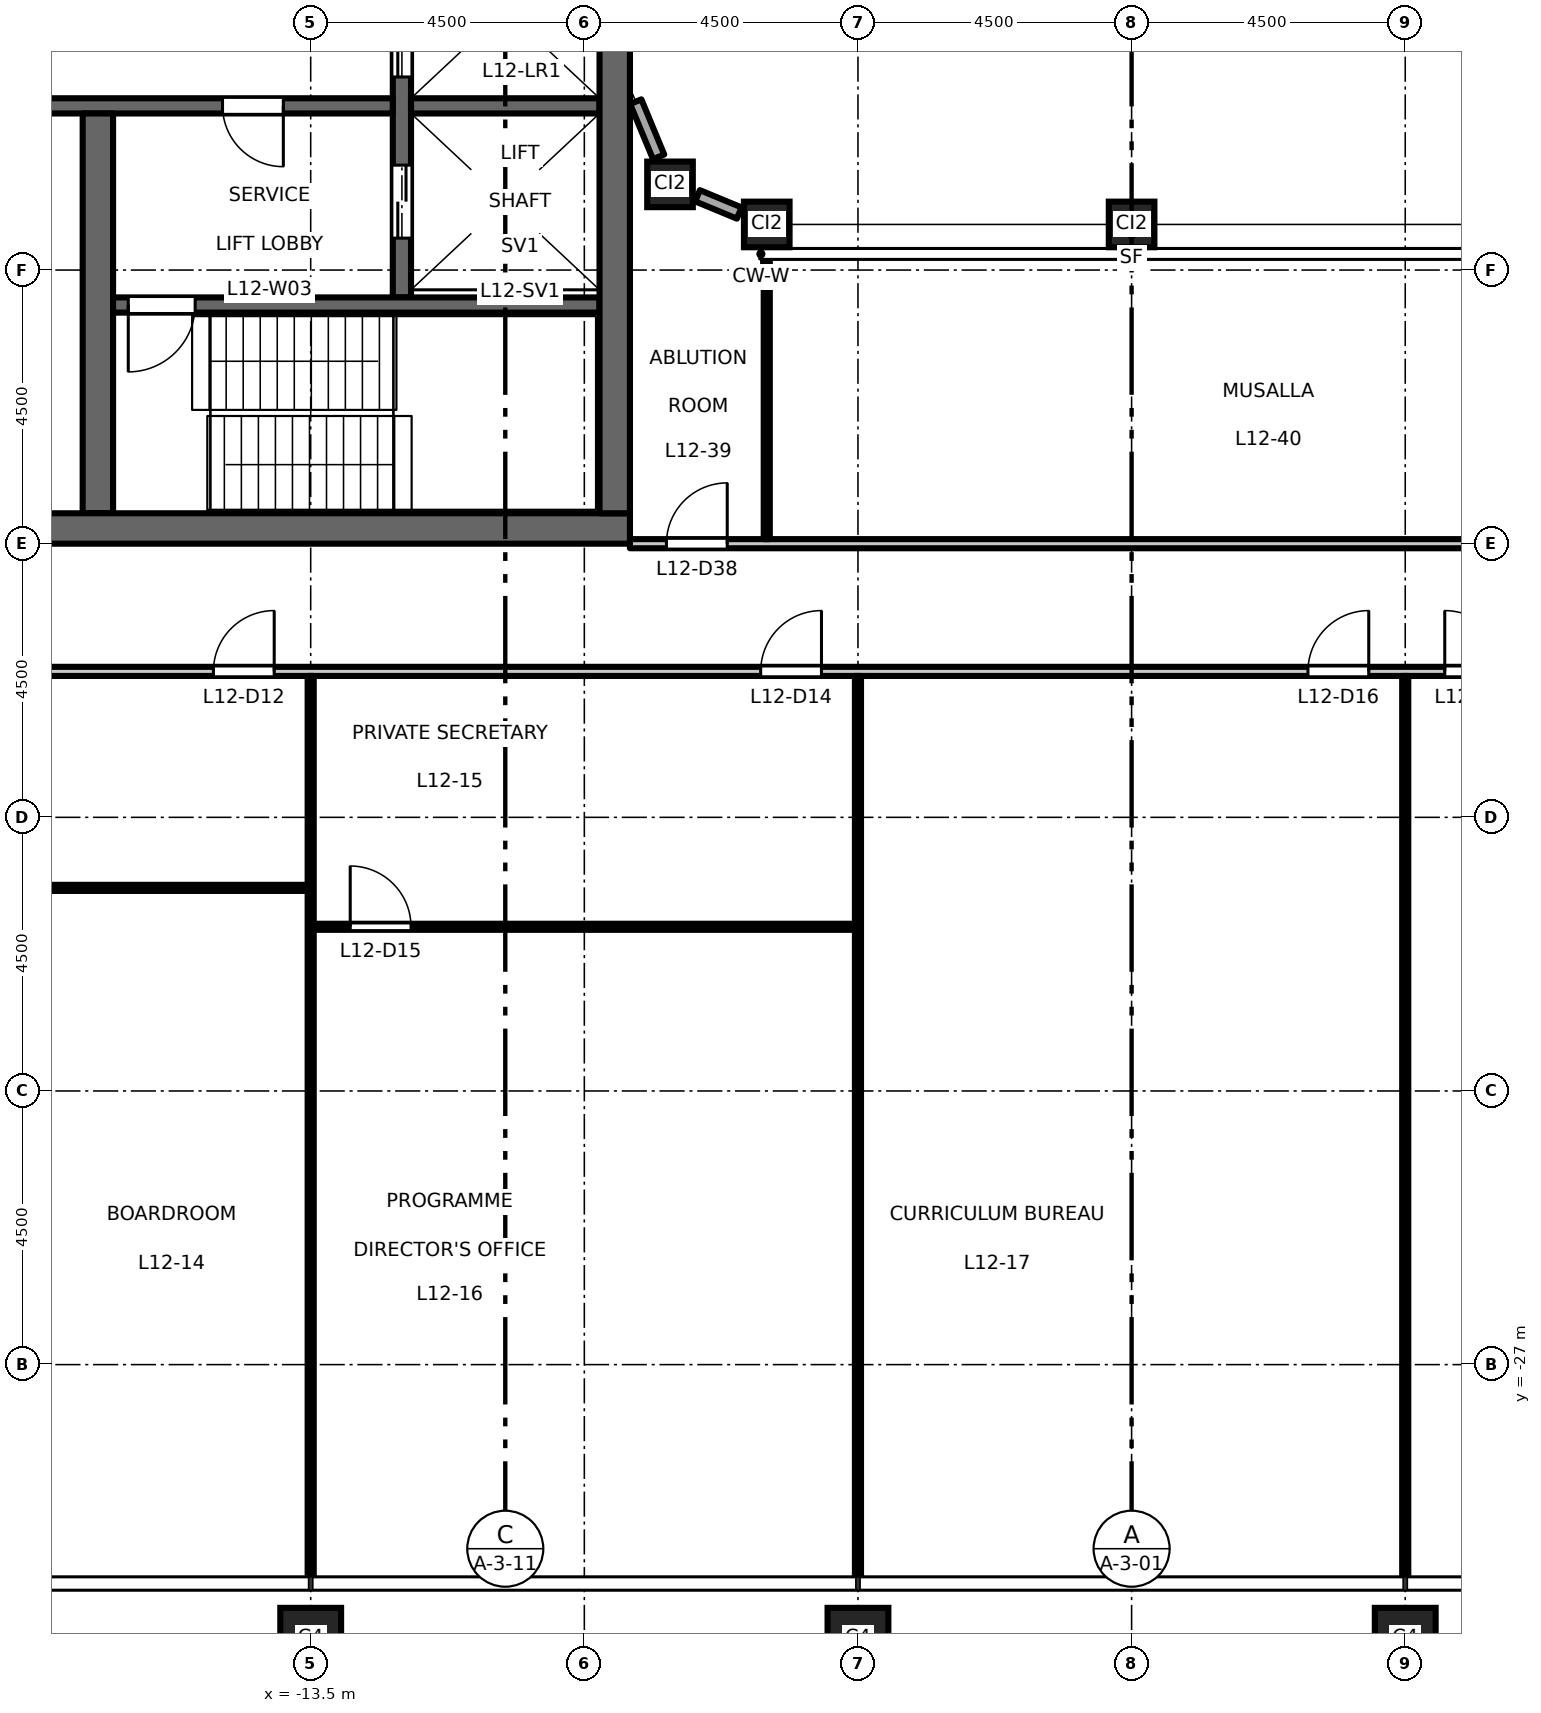
"""IFC4 building model, lengths in metres.
Left out: names, types, materials, properties, quantities, classifications, styles, units other than length and angle.
Written with IfcOpenShell. Run it as: python <this file> out.ifc"""

import sys

from ifc_helpers import new_model, si_unit, direction, frame, frame_2d, origin, origin_2d, place, context, subcontext, project, spatial, rectangle, hollow_rectangle, extrude, element, fill, save


model = new_model("IFC4")
c1 = context("Model", 3, precision=1e-05, world=origin(), true_north=direction((0.0, 1.0)))
c2 = subcontext(c1, "Body", "Model", "MODEL_VIEW")
j1 = project(units=[si_unit("LENGTHUNIT", "METRE"), si_unit("PLANEANGLEUNIT", "RADIAN")], contexts=[c1])
p1 = place(None, origin())
s1 = spatial("IfcSite", under=j1, at=p1, CompositionType="ELEMENT")
p2 = place(p1, origin())
s2 = spatial("IfcBuilding", under=s1, at=p2, CompositionType="ELEMENT")
p3 = place(p2, frame((0.0, 0.0, 58.2)))
s3 = spatial("IfcBuildingStorey", under=s2, at=p3, CompositionType="ELEMENT", Elevation=58.2)
for number, where, z_axis, x_axis in (
    (1, (-13.5, -31.5, 0.0), (0.0, 0.0, 1.0), (1.0, 0.0, 0.0)),
    (2, (-4.5, -31.5, 0.0), (0.0, 0.0, 1.0), (1.0, 0.0, 0.0)),
    (3, (4.5, -31.5, 0.0), (0.0, 0.0, 1.0), (1.0, 0.0, 0.0)),
):
    element("IfcColumn", number, at=place(p3, frame(where, z_axis=z_axis, x_axis=x_axis)), inside=s3, PredefinedType="COLUMN", context=c2, shape_type="SweptSolid", body=[
        extrude(hollow_rectangle(XDim=1.0, YDim=1.0, WallThickness=0.06, at=origin_2d()), origin(), (0.0, 0.0, 1.0), 4.5),
    ])
for number, where, z_axis, x_axis in (
    (4, (-7.591, -7.591, 0.0), (0.0, 0.0, 1.0), (1.0, 0.0, 0.0)),
    (5, (-6.0, -8.25, 0.0), (0.0, 0.0, 1.0), (1.0, 0.0, 0.0)),
    (6, (0.0, -8.25, 0.0), (0.0, 0.0, 1.0), (1.0, 0.0, 0.0)),
):
    element("IfcColumn", number, at=place(p3, frame(where, z_axis=z_axis, x_axis=x_axis)), inside=s3, PredefinedType="COLUMN", context=c2, shape_type="SweptSolid", body=[
        extrude(hollow_rectangle(XDim=0.75, YDim=0.75, WallThickness=0.045, at=origin_2d()), origin(), (0.0, 0.0, 1.0), 4.5),
    ])
p4 = place(p3, frame((-12.0, -9.45, 0.0), z_axis=(0.0, 0.0, 1.0), x_axis=(0.0, 1.0, 0.0)))
e7 = element("IfcWall", 7, at=p4, inside=s3, PredefinedType="SHEAR", context=c2, shape_type="SweptSolid", body=[
    extrude(rectangle(XDim=18.9, YDim=0.3, at=frame_2d((9.45, 0.0))), origin(), (0.0, 0.0, 1.0), 4.35),
])
p5 = place(p4, frame((3.625, 0.0, 0.0)))
e8 = element("IfcOpeningElement", 8, at=p5, cuts=e7, PredefinedType="OPENING", context=c2, shape_type="SweptSolid", body=[
    extrude(rectangle(XDim=1.1, YDim=2.1, at=frame_2d((0.55, 1.05))), frame((0.0, 0.16, 0.0), z_axis=(0.0, -1.0, 0.0), x_axis=(1.0, 0.0, 0.0)), (0.0, 0.0, 1.0), 0.32),
])
p6 = place(p4, frame((6.775, 0.0, 0.0)))
e9 = element("IfcOpeningElement", 9, at=p6, cuts=e7, PredefinedType="OPENING", context=c2, shape_type="SweptSolid", body=[
    extrude(rectangle(XDim=1.1, YDim=2.1, at=frame_2d((0.55, 1.05))), frame((0.0, 0.16, 0.0), z_axis=(0.0, -1.0, 0.0), x_axis=(1.0, 0.0, 0.0)), (0.0, 0.0, 1.0), 0.32),
])
p7 = place(p4, frame((9.925, 0.0, 0.0)))
e10 = element("IfcOpeningElement", 10, at=p7, cuts=e7, PredefinedType="OPENING", context=c2, shape_type="SweptSolid", body=[
    extrude(rectangle(XDim=1.1, YDim=2.1, at=frame_2d((0.55, 1.05))), frame((0.0, 0.16, 0.0), z_axis=(0.0, -1.0, 0.0), x_axis=(1.0, 0.0, 0.0)), (0.0, 0.0, 1.0), 0.32),
])
p8 = place(p4, frame((13.075, 0.0, 0.0)))
e11 = element("IfcOpeningElement", 11, at=p8, cuts=e7, PredefinedType="OPENING", context=c2, shape_type="SweptSolid", body=[
    extrude(rectangle(XDim=1.1, YDim=2.1, at=frame_2d((0.55, 1.05))), frame((0.0, 0.16, 0.0), z_axis=(0.0, -1.0, 0.0), x_axis=(1.0, 0.0, 0.0)), (0.0, 0.0, 1.0), 0.32),
])
p9 = place(p4, frame((16.725, 0.0, 0.0)))
e12 = element("IfcOpeningElement", 12, at=p9, cuts=e7, PredefinedType="OPENING", context=c2, shape_type="SweptSolid", body=[
    extrude(rectangle(XDim=1.2, YDim=2.1, at=frame_2d((0.6, 1.05))), frame((0.0, 0.16, 0.0), z_axis=(0.0, -1.0, 0.0), x_axis=(1.0, 0.0, 0.0)), (0.0, 0.0, 1.0), 0.32),
])
p10 = place(p4, frame((0.975, 0.0, 0.0)))
e13 = element("IfcOpeningElement", 13, at=p10, cuts=e7, PredefinedType="OPENING", context=c2, shape_type="SweptSolid", body=[
    extrude(rectangle(XDim=1.2, YDim=2.1, at=frame_2d((0.6, 1.05))), frame((0.0, 0.16, 0.0), z_axis=(0.0, -1.0, 0.0), x_axis=(1.0, 0.0, 0.0)), (0.0, 0.0, 1.0), 0.32),
])
p11 = place(p3, frame((-12.15, -6.3, 0.0), z_axis=(0.0, 0.0, 1.0), x_axis=(-1.0, 0.0, 0.0)))
e14 = element("IfcWall", 14, at=p11, inside=s3, PredefinedType="SHEAR", context=c2, shape_type="SweptSolid", body=[
    extrude(rectangle(XDim=9.1, YDim=0.25, at=frame_2d((4.55, 0.0))), origin(), (0.0, 0.0, 1.0), 4.35),
])
p12 = place(p11, frame((1.8, 0.0, 0.0)))
e15 = element("IfcOpeningElement", 15, at=p12, cuts=e14, PredefinedType="OPENING", context=c2, shape_type="SweptSolid", body=[
    extrude(rectangle(XDim=1.0, YDim=2.1, at=frame_2d((0.5, 1.05))), frame((0.0, 0.135, 0.0), z_axis=(0.0, -1.0, 0.0), x_axis=(1.0, 0.0, 0.0)), (0.0, 0.0, 1.0), 0.27),
])
p13 = place(p11, frame((6.65, 0.0, 0.0)))
e16 = element("IfcOpeningElement", 16, at=p13, cuts=e14, PredefinedType="OPENING", context=c2, shape_type="SweptSolid", body=[
    extrude(rectangle(XDim=0.9, YDim=2.1, at=frame_2d((0.45, 1.05))), frame((0.0, 0.135, 0.0), z_axis=(0.0, -1.0, 0.0), x_axis=(1.0, 0.0, 0.0)), (0.0, 0.0, 1.0), 0.27),
])
p14 = place(p3, frame((-17.0, -13.0, 0.0), z_axis=(0.0, 0.0, 1.0), x_axis=(0.0, 1.0, 0.0)))
e17 = element("IfcWall", 17, at=p14, inside=s3, PredefinedType="SHEAR", context=c2, shape_type="SweptSolid", body=[
    extrude(rectangle(XDim=6.575, YDim=0.5, at=frame_2d((3.288, 0.0))), origin(), (0.0, 0.0, 1.0), 4.35),
])
p15 = place(p3, frame((-8.75, -6.3, 0.0), z_axis=(0.0, 0.0, 1.0), x_axis=(-1.0, 0.0, 0.0)))
e18 = element("IfcWall", 18, at=p15, inside=s3, PredefinedType="SHEAR", context=c2, shape_type="SweptSolid", body=[
    extrude(rectangle(XDim=3.1, YDim=0.25, at=frame_2d((1.55, 0.0))), origin(), (0.0, 0.0, 1.0), 4.35),
])
p16 = place(p3, frame((-8.75, -9.575, 0.0), z_axis=(0.0, 0.0, 1.0), x_axis=(-1.0, 0.0, 0.0)))
e19 = element("IfcWall", 19, at=p16, inside=s3, PredefinedType="SHEAR", context=c2, shape_type="SweptSolid", body=[
    extrude(rectangle(XDim=8.0, YDim=0.25, at=frame_2d((4.0, 0.0))), origin(), (0.0, 0.0, 1.0), 4.35),
])
p17 = place(p16, frame((6.65, 0.0, 0.0)))
e20 = element("IfcOpeningElement", 20, at=p17, cuts=e19, PredefinedType="OPENING", context=c2, shape_type="SweptSolid", body=[
    extrude(rectangle(XDim=1.1, YDim=2.1, at=frame_2d((0.55, 1.05))), frame((0.0, 0.135, 0.0), z_axis=(0.0, -1.0, 0.0), x_axis=(1.0, 0.0, 0.0)), (0.0, 0.0, 1.0), 0.27),
])
p18 = place(p3, frame((-8.25, -13.25, 0.0), z_axis=(0.0, 0.0, 1.0), x_axis=(-1.0, 0.0, 0.0)))
e21 = element("IfcWall", 21, at=p18, inside=s3, PredefinedType="SHEAR", context=c2, shape_type="SweptSolid", body=[
    extrude(rectangle(XDim=13.5, YDim=0.5, at=frame_2d((6.75, 0.0))), origin(), (0.0, 0.0, 1.0), 4.35),
])
p19 = place(p3, frame((-8.5, -13.0, 0.0), z_axis=(0.0, 0.0, 1.0), x_axis=(0.0, 1.0, 0.0)))
e22 = element("IfcWall", 22, at=p19, inside=s3, PredefinedType="SHEAR", context=c2, shape_type="SweptSolid", body=[
    extrude(rectangle(XDim=26.0, YDim=0.5, at=frame_2d((13.0, 0.0))), origin(), (0.0, 0.0, 1.0), 4.35),
])
p20 = place(p3, frame((-8.154, -6.231, 0.0), z_axis=(0.0, 0.0, 1.0), x_axis=(0.382549378284, -0.923935048136, 0.0)))
e23 = element("IfcWall", 23, at=p20, inside=s3, PredefinedType="STANDARD", context=c2, shape_type="SweptSolid", body=[
    extrude(rectangle(XDim=0.982, YDim=0.2, at=frame_2d((0.491, 0.0))), origin(), (0.0, 0.0, 1.0), 3.73),
])
p21 = place(p3, frame((-7.138, -7.779, 0.0), z_axis=(0.0, 0.0, 1.0), x_axis=(0.923940677943, -0.382535780864, 0.0)))
e24 = element("IfcWall", 24, at=p21, inside=s3, PredefinedType="STANDARD", context=c2, shape_type="SweptSolid", body=[
    extrude(rectangle(XDim=0.742, YDim=0.2, at=frame_2d((0.371, 0.0))), origin(), (0.0, 0.0, 1.0), 3.73),
])
p22 = place(p3, frame((-13.45, -19.8, 0.0), z_axis=(0.0, 0.0, 1.0), x_axis=(1.0, 0.0, 0.0)))
e25 = element("IfcWall", 25, at=p22, inside=s3, PredefinedType="PARTITIONING", context=c2, shape_type="SweptSolid", body=[
    extrude(rectangle(XDim=8.9, YDim=0.1, at=frame_2d((4.45, 0.0))), origin(), (0.0, 0.0, 1.0), 4.35),
])
p23 = place(p22, frame((0.6, 0.0, 0.0)))
e26 = element("IfcOpeningElement", 26, at=p23, cuts=e25, PredefinedType="OPENING", context=c2, shape_type="SweptSolid", body=[
    extrude(rectangle(XDim=1.0, YDim=2.1, at=frame_2d((0.5, 1.05))), frame((0.0, 0.06, 0.0), z_axis=(0.0, -1.0, 0.0), x_axis=(1.0, 0.0, 0.0)), (0.0, 0.0, 1.0), 0.12),
])
p24 = place(p3, frame((-22.45, -19.16, 0.0), z_axis=(0.0, 0.0, 1.0), x_axis=(1.0, 0.0, 0.0)))
e27 = element("IfcWall", 27, at=p24, inside=s3, PredefinedType="PARTITIONING", context=c2, shape_type="SweptSolid", body=[
    extrude(rectangle(XDim=8.9, YDim=0.1, at=frame_2d((4.45, 0.0))), origin(), (0.0, 0.0, 1.0), 4.35),
])
p25 = place(p24, frame((0.6, 0.0, 0.0)))
e28 = element("IfcOpeningElement", 28, at=p25, cuts=e27, PredefinedType="OPENING", context=c2, shape_type="SweptSolid", body=[
    extrude(rectangle(XDim=1.0, YDim=2.1, at=frame_2d((0.5, 1.05))), frame((0.0, 0.06, 0.0), z_axis=(0.0, -1.0, 0.0), x_axis=(1.0, 0.0, 0.0)), (0.0, 0.0, 1.0), 0.12),
])
p26 = place(p3, frame((-23.925, -15.6, 0.0), z_axis=(0.0, 0.0, 1.0), x_axis=(1.0, 0.0, 0.0)))
e29 = element("IfcWall", 29, at=p26, inside=s3, PredefinedType="PARTITIONING", context=c2, shape_type="SweptSolid", body=[
    extrude(rectangle(XDim=47.85, YDim=0.15, at=frame_2d((23.925, 0.0))), origin(), (0.0, 0.0, 1.0), 4.35),
])
p27 = place(p26, frame((8.825, 0.0, 0.0)))
e30 = element("IfcOpeningElement", 30, at=p27, cuts=e29, PredefinedType="OPENING", context=c2, shape_type="SweptSolid", body=[
    extrude(rectangle(XDim=1.0, YDim=2.1, at=frame_2d((0.5, 1.05))), frame((0.0, 0.085, 0.0), z_axis=(0.0, -1.0, 0.0), x_axis=(1.0, 0.0, 0.0)), (0.0, 0.0, 1.0), 0.17),
])
p28 = place(p26, frame((17.825, 0.0, 0.0)))
e31 = element("IfcOpeningElement", 31, at=p28, cuts=e29, PredefinedType="OPENING", context=c2, shape_type="SweptSolid", body=[
    extrude(rectangle(XDim=1.0, YDim=2.1, at=frame_2d((0.5, 1.05))), frame((0.0, 0.085, 0.0), z_axis=(0.0, -1.0, 0.0), x_axis=(1.0, 0.0, 0.0)), (0.0, 0.0, 1.0), 0.17),
])
p29 = place(p26, frame((26.825, 0.0, 0.0)))
e32 = element("IfcOpeningElement", 32, at=p29, cuts=e29, PredefinedType="OPENING", context=c2, shape_type="SweptSolid", body=[
    extrude(rectangle(XDim=1.0, YDim=2.1, at=frame_2d((0.5, 1.05))), frame((0.0, 0.085, 0.0), z_axis=(0.0, -1.0, 0.0), x_axis=(1.0, 0.0, 0.0)), (0.0, 0.0, 1.0), 0.17),
])
p30 = place(p26, frame((29.075, 0.0, 0.0)))
e33 = element("IfcOpeningElement", 33, at=p30, cuts=e29, PredefinedType="OPENING", context=c2, shape_type="SweptSolid", body=[
    extrude(rectangle(XDim=1.0, YDim=2.1, at=frame_2d((0.5, 1.05))), frame((0.0, 0.085, 0.0), z_axis=(0.0, -1.0, 0.0), x_axis=(1.0, 0.0, 0.0)), (0.0, 0.0, 1.0), 0.17),
])
p31 = place(p26, frame((44.825, 0.0, 0.0)))
e34 = element("IfcOpeningElement", 34, at=p31, cuts=e29, PredefinedType="OPENING", context=c2, shape_type="SweptSolid", body=[
    extrude(rectangle(XDim=1.0, YDim=2.1, at=frame_2d((0.5, 1.05))), frame((0.0, 0.085, 0.0), z_axis=(0.0, -1.0, 0.0), x_axis=(1.0, 0.0, 0.0)), (0.0, 0.0, 1.0), 0.17),
])
p32 = place(p3, frame((-8.25, -13.5, 0.0), z_axis=(0.0, 0.0, 1.0), x_axis=(1.0, 0.0, 0.0)))
e35 = element("IfcWall", 35, at=p32, inside=s3, PredefinedType="PARTITIONING", context=c2, shape_type="SweptSolid", body=[
    extrude(rectangle(XDim=16.5, YDim=0.15, at=frame_2d((8.25, 0.0))), origin(), (0.0, 0.0, 1.0), 3.85),
])
p33 = place(p32, frame((0.6, 0.0, 0.0)))
e36 = element("IfcOpeningElement", 36, at=p33, cuts=e35, PredefinedType="OPENING", context=c2, shape_type="SweptSolid", body=[
    extrude(rectangle(XDim=1.0, YDim=2.1, at=frame_2d((0.5, 1.05))), frame((0.0, 0.085, 0.0), z_axis=(0.0, -1.0, 0.0), x_axis=(1.0, 0.0, 0.0)), (0.0, 0.0, 1.0), 0.17),
])
p34 = place(p32, frame((14.85, 0.0, 0.0)))
e37 = element("IfcOpeningElement", 37, at=p34, cuts=e35, PredefinedType="OPENING", context=c2, shape_type="SweptSolid", body=[
    extrude(rectangle(XDim=1.0, YDim=2.1, at=frame_2d((0.5, 1.05))), frame((0.0, 0.085, 0.0), z_axis=(0.0, -1.0, 0.0), x_axis=(1.0, 0.0, 0.0)), (0.0, 0.0, 1.0), 0.17),
])
p35 = place(p3, frame((-13.5, -30.51, 0.0), z_axis=(0.0, 0.0, 1.0), x_axis=(0.0, 1.0, 0.0)))
e38 = element("IfcWall", 38, at=p35, inside=s3, PredefinedType="PARTITIONING", context=c2, shape_type="SweptSolid", body=[
    extrude(rectangle(XDim=14.835, YDim=0.1, at=frame_2d((7.417, 0.0))), origin(), (0.0, 0.0, 1.0), 3.35),
])
p36 = place(p3, frame((-6.0, -13.425, 0.0), z_axis=(0.0, 0.0, 1.0), x_axis=(0.0, 1.0, 0.0)))
e39 = element("IfcWall", 39, at=p36, inside=s3, PredefinedType="PARTITIONING", context=c2, shape_type="SweptSolid", body=[
    extrude(rectangle(XDim=4.725, YDim=0.1, at=frame_2d((2.363, 0.0))), origin(), (0.0, 0.0, 1.0), 4.35),
])
for number, where, z_axis, x_axis in (
    (40, (-4.5, -30.51, 0.0), (0.0, 0.0, 1.0), (0.0, 1.0, 0.0)),
    (41, (4.5, -30.51, 0.0), (0.0, 0.0, 1.0), (0.0, 1.0, 0.0)),
):
    element("IfcWall", number, at=place(p3, frame(where, z_axis=z_axis, x_axis=x_axis)), inside=s3, PredefinedType="PARTITIONING", context=c2, shape_type="SweptSolid", body=[
        extrude(rectangle(XDim=14.835, YDim=0.1, at=frame_2d((7.417, 0.0))), origin(), (0.0, 0.0, 1.0), 3.35),
    ])
p37 = place(p12, origin())
e42 = element("IfcDoor", 42, at=p37, inside=s3, OperationType="SINGLE_SWING_RIGHT", PredefinedType="DOOR", context=c2, shape_type="SweptSolid", body=[
    extrude(rectangle(XDim=1.0, YDim=2.1, at=frame_2d((0.5, 1.05))), frame((0.0, 0.025, 0.0), z_axis=(0.0, -1.0, 0.0), x_axis=(1.0, 0.0, 0.0)), (0.0, 0.0, 1.0), 0.05),
])
fill(e15, e42)
p38 = place(p17, origin())
e43 = element("IfcDoor", 43, at=p38, inside=s3, OperationType="SINGLE_SWING_LEFT", PredefinedType="DOOR", context=c2, shape_type="SweptSolid", body=[
    extrude(rectangle(XDim=1.1, YDim=2.1, at=frame_2d((0.55, 1.05))), frame((0.0, 0.025, 0.0), z_axis=(0.0, -1.0, 0.0), x_axis=(1.0, 0.0, 0.0)), (0.0, 0.0, 1.0), 0.05),
])
fill(e20, e43)
p39 = place(p5, origin())
e44 = element("IfcDoor", 44, at=p39, inside=s3, OperationType="DOUBLE_DOOR_SLIDING", PredefinedType="DOOR", context=c2, shape_type="SweptSolid", body=[
    extrude(rectangle(XDim=1.1, YDim=2.1, at=frame_2d((0.55, 1.05))), frame((0.0, 0.025, 0.0), z_axis=(0.0, -1.0, 0.0), x_axis=(1.0, 0.0, 0.0)), (0.0, 0.0, 1.0), 0.05),
])
fill(e8, e44)
p40 = place(p10, origin())
e45 = element("IfcDoor", 45, at=p40, inside=s3, OperationType="DOUBLE_DOOR_SLIDING", PredefinedType="DOOR", context=c2, shape_type="SweptSolid", body=[
    extrude(rectangle(XDim=1.2, YDim=2.1, at=frame_2d((0.6, 1.05))), frame((0.0, 0.025, 0.0), z_axis=(0.0, -1.0, 0.0), x_axis=(1.0, 0.0, 0.0)), (0.0, 0.0, 1.0), 0.05),
])
fill(e13, e45)
p41 = place(p27, origin())
e46 = element("IfcDoor", 46, at=p41, inside=s3, OperationType="SINGLE_SWING_RIGHT", PredefinedType="DOOR", context=c2, shape_type="SweptSolid", body=[
    extrude(rectangle(XDim=1.0, YDim=2.1, at=frame_2d((0.5, 1.05))), frame((0.0, 0.025, 0.0), z_axis=(0.0, -1.0, 0.0), x_axis=(1.0, 0.0, 0.0)), (0.0, 0.0, 1.0), 0.05),
])
fill(e30, e46)
p42 = place(p28, origin())
e47 = element("IfcDoor", 47, at=p42, inside=s3, OperationType="SINGLE_SWING_RIGHT", PredefinedType="DOOR", context=c2, shape_type="SweptSolid", body=[
    extrude(rectangle(XDim=1.0, YDim=2.1, at=frame_2d((0.5, 1.05))), frame((0.0, 0.025, 0.0), z_axis=(0.0, -1.0, 0.0), x_axis=(1.0, 0.0, 0.0)), (0.0, 0.0, 1.0), 0.05),
])
fill(e31, e47)
p43 = place(p23, origin())
e48 = element("IfcDoor", 48, at=p43, inside=s3, OperationType="SINGLE_SWING_LEFT", PredefinedType="DOOR", context=c2, shape_type="SweptSolid", body=[
    extrude(rectangle(XDim=1.0, YDim=2.1, at=frame_2d((0.5, 1.05))), frame((0.0, 0.025, 0.0), z_axis=(0.0, -1.0, 0.0), x_axis=(1.0, 0.0, 0.0)), (0.0, 0.0, 1.0), 0.05),
])
fill(e26, e48)
p44 = place(p29, origin())
e49 = element("IfcDoor", 49, at=p44, inside=s3, OperationType="SINGLE_SWING_RIGHT", PredefinedType="DOOR", context=c2, shape_type="SweptSolid", body=[
    extrude(rectangle(XDim=1.0, YDim=2.1, at=frame_2d((0.5, 1.05))), frame((0.0, 0.025, 0.0), z_axis=(0.0, -1.0, 0.0), x_axis=(1.0, 0.0, 0.0)), (0.0, 0.0, 1.0), 0.05),
])
fill(e32, e49)
p45 = place(p30, origin())
e50 = element("IfcDoor", 50, at=p45, inside=s3, OperationType="SINGLE_SWING_LEFT", PredefinedType="DOOR", context=c2, shape_type="SweptSolid", body=[
    extrude(rectangle(XDim=1.0, YDim=2.1, at=frame_2d((0.5, 1.05))), frame((0.0, 0.025, 0.0), z_axis=(0.0, -1.0, 0.0), x_axis=(1.0, 0.0, 0.0)), (0.0, 0.0, 1.0), 0.05),
])
fill(e33, e50)
p46 = place(p33, origin())
e51 = element("IfcDoor", 51, at=p46, inside=s3, OperationType="SINGLE_SWING_RIGHT", PredefinedType="DOOR", context=c2, shape_type="SweptSolid", body=[
    extrude(rectangle(XDim=1.0, YDim=2.1, at=frame_2d((0.5, 1.05))), frame((0.0, 0.025, 0.0), z_axis=(0.0, -1.0, 0.0), x_axis=(1.0, 0.0, 0.0)), (0.0, 0.0, 1.0), 0.05),
])
fill(e36, e51)
save(model, sys.argv[1])
